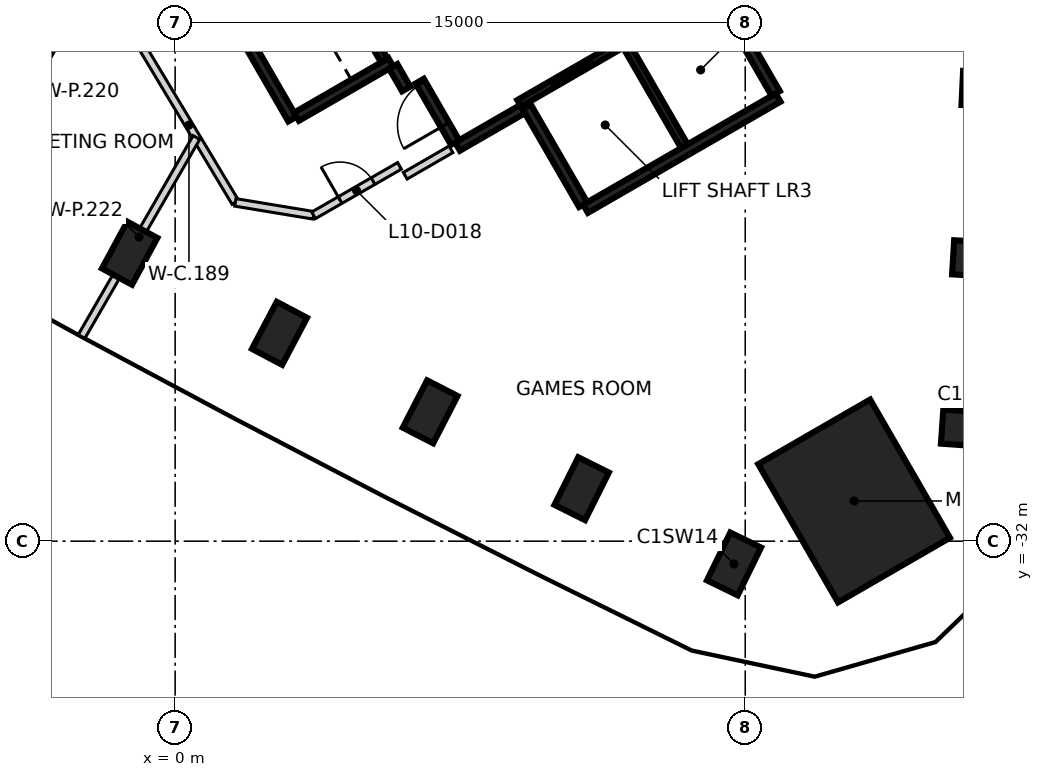
"""IFC4 building model, lengths in metres.
Left out: names, types, materials, properties, quantities, classifications, styles, units other than length and angle.
Written with IfcOpenShell. Run it as: python <this file> out.ifc"""

import sys

from ifc_helpers import new_model, si_unit, direction, frame, frame_2d, origin, origin_2d, place, context, subcontext, project, spatial, rectangle, extrude, element, fill, save


model = new_model("IFC4")
c1 = context("Model", 3, precision=1e-05, world=origin(), true_north=direction((0.0, 1.0)))
c2 = subcontext(c1, "Body", "Model", "MODEL_VIEW")
j1 = project(units=[si_unit("LENGTHUNIT", "METRE"), si_unit("PLANEANGLEUNIT", "RADIAN")], contexts=[c1])
p1 = place(None, origin())
s1 = spatial("IfcSite", under=j1, at=p1, CompositionType="ELEMENT")
p2 = place(p1, origin())
s2 = spatial("IfcBuilding", under=s1, at=p2, CompositionType="ELEMENT")
p3 = place(p2, frame((0.0, 0.0, 49.4)))
s3 = spatial("IfcBuildingStorey", under=s2, at=p3, CompositionType="ELEMENT", Elevation=49.4)
for number, where, z_axis, x_axis in (
    (1, (20.879, -29.034, -0.475), (0.0, 0.0, 1.0), (-0.998, 0.07, 0.0)),
    (2, (21.169, -24.573, -0.475), (0.0, 0.0, 1.0), (-0.998, 0.06, 0.0)),
    (3, (21.41, -20.109, -0.475), (0.0, 0.0, 1.0), (-0.999, 0.048, 0.0)),
    (4, (-1.197, -24.423, -0.475), (0.0, 0.0, 1.0), (0.476, 0.879, 0.0)),
    (5, (2.745, -26.531, -0.475), (0.0, 0.0, 1.0), (0.467, 0.884, 0.0)),
    (6, (6.71, -28.596, -0.475), (0.0, 0.0, 1.0), (0.458, 0.889, 0.0)),
    (7, (10.696, -30.619, -0.475), (0.0, 0.0, 1.0), (0.447, 0.894, 0.0)),
    (8, (14.705, -32.599, -0.475), (0.0, 0.0, 1.0), (0.438, 0.899, 0.0)),
):
    element("IfcColumn", number, at=place(p3, frame(where, z_axis=z_axis, x_axis=x_axis)), inside=s3, PredefinedType="COLUMN", context=c2, shape_type="SweptSolid", body=[
        extrude(rectangle(XDim=1.4, YDim=0.9, at=origin_2d()), origin(), (0.0, 0.0, 1.0), 3.6),
    ])
p4 = place(p3, frame((17.865, -30.942, -0.475), z_axis=(0.0, 0.0, 1.0), x_axis=(-0.5, 0.866025403784, 0.0)))
e9 = element("IfcColumn", 9, at=p4, inside=s3, PredefinedType="COLUMN", context=c2, shape_type="SweptSolid", body=[
    extrude(rectangle(XDim=4.2, YDim=3.4, at=origin_2d()), origin(), (0.0, 0.0, 1.0), 3.6),
])
p5 = place(p3, frame((15.865, -20.328, 0.0), z_axis=(0.0, 0.0, 1.0), x_axis=(-0.86602852612, -0.499994591916, 0.0)))
e10 = element("IfcWall", 10, at=p5, inside=s3, PredefinedType="SHEAR", context=c2, shape_type="SweptSolid", body=[
    extrude(rectangle(XDim=5.85, YDim=0.25, at=frame_2d((2.925, 0.0))), origin(), (0.0, 0.0, 1.0), 3.125),
])
for number, where, z_axis, x_axis in (
    (11, (14.315, -17.644, 0.0), (0.0, 0.0, 1.0), (0.5, -0.866, 0.0)),
    (12, (10.736, -23.145, 0.0), (0.0, 0.0, 1.0), (-0.5, 0.866, 0.0)),
):
    element("IfcWall", number, at=place(p3, frame(where, z_axis=z_axis, x_axis=x_axis)), inside=s3, PredefinedType="SHEAR", context=c2, shape_type="SweptSolid", body=[
        extrude(rectangle(XDim=2.974, YDim=0.25, at=frame_2d((1.487, 0.0))), origin(), (0.0, 0.0, 1.0), 3.125),
    ])
p6 = place(p3, frame((3.085, -20.894, 0.0), z_axis=(0.0, 0.0, 1.0), x_axis=(-0.499978833458, 0.866037623948, 0.0)))
e13 = element("IfcWall", 13, at=p6, inside=s3, PredefinedType="SHEAR", context=c2, shape_type="SweptSolid", body=[
    extrude(rectangle(XDim=3.05, YDim=0.25, at=frame_2d((1.525, 0.0))), origin(), (0.0, 0.0, 1.0), 3.125),
])
p7 = place(p3, frame((5.675, -19.399, 0.0), z_axis=(0.0, 0.0, 1.0), x_axis=(-0.866026637627, -0.499997862916, 0.0)))
e14 = element("IfcWall", 14, at=p7, inside=s3, PredefinedType="SHEAR", context=c2, shape_type="SweptSolid", body=[
    extrude(rectangle(XDim=2.865, YDim=0.25, at=frame_2d((1.432, 0.0))), origin(), (0.0, 0.0, 1.0), 3.125),
])
p8 = place(p3, frame((9.14, -20.631, 0.0), z_axis=(0.0, 0.0, 1.0), x_axis=(-0.866043531843, -0.499968599967, 0.0)))
e15 = element("IfcWall", 15, at=p8, inside=s3, PredefinedType="SHEAR", context=c2, shape_type="SweptSolid", body=[
    extrude(rectangle(XDim=1.975, YDim=0.25, at=frame_2d((0.987, 0.0))), origin(), (0.0, 0.0, 1.0), 3.125),
])
p9 = place(p3, frame((7.367, -21.51, 0.0), z_axis=(0.0, 0.0, 1.0), x_axis=(-0.499983108224, 0.866035156036, 0.0)))
e16 = element("IfcWall", 16, at=p9, inside=s3, PredefinedType="SHEAR", context=c2, shape_type="SweptSolid", body=[
    extrude(rectangle(XDim=1.865, YDim=0.25, at=frame_2d((0.932, 0.0))), origin(), (0.0, 0.0, 1.0), 3.125),
])
p10 = place(p9, frame((0.535, 0.0, 0.0)))
e17 = element("IfcOpeningElement", 17, at=p10, cuts=e16, PredefinedType="OPENING", context=c2, shape_type="SweptSolid", body=[
    extrude(rectangle(XDim=1.25, YDim=2.1, at=frame_2d((0.625, 1.05))), frame((0.0, 0.135, 0.0), z_axis=(0.0, -1.0, 0.0), x_axis=(1.0, 0.0, 0.0)), (0.0, 0.0, 1.0), 0.27),
])
p11 = place(p3, frame((6.08, -20.1, 0.0), z_axis=(0.0, 0.0, 1.0), x_axis=(-0.500051773299, 0.865995510393, 0.0)))
e18 = element("IfcWall", 18, at=p11, inside=s3, PredefinedType="SHEAR", context=c2, shape_type="SweptSolid", body=[
    extrude(rectangle(XDim=0.685, YDim=0.25, at=frame_2d((0.342, 0.0))), origin(), (0.0, 0.0, 1.0), 3.125),
])
p12 = place(p3, frame((9.052, -20.48, 0.0), z_axis=(0.0, 0.0, 1.0), x_axis=(0.866030299012, 0.499991521122, 0.0)))
e19 = element("IfcWall", 19, at=p12, inside=s3, PredefinedType="SHEAR", context=c2, shape_type="SweptSolid", body=[
    extrude(rectangle(XDim=6.1, YDim=0.2, at=frame_2d((3.05, 0.0))), origin(), (0.0, 0.0, 1.0), 3.125),
])
p13 = place(p12, frame((1.0, 0.0, 0.0)))
e20 = element("IfcOpeningElement", 20, at=p13, cuts=e19, PredefinedType="OPENING", context=c2, shape_type="SweptSolid", body=[
    extrude(rectangle(XDim=1.2, YDim=2.1, at=frame_2d((0.6, 1.05))), frame((0.0, 0.11, 0.0), z_axis=(0.0, -1.0, 0.0), x_axis=(1.0, 0.0, 0.0)), (0.0, 0.0, 1.0), 0.22),
])
p14 = place(p12, frame((4.05, 0.0, 0.0)))
e21 = element("IfcOpeningElement", 21, at=p14, cuts=e19, PredefinedType="OPENING", context=c2, shape_type="SweptSolid", body=[
    extrude(rectangle(XDim=1.2, YDim=2.1, at=frame_2d((0.6, 1.05))), frame((0.0, 0.11, 0.0), z_axis=(0.0, -1.0, 0.0), x_axis=(1.0, 0.0, 0.0)), (0.0, 0.0, 1.0), 0.22),
])
p15 = place(p3, frame((11.875, -18.967, 0.0), z_axis=(0.0, 0.0, 1.0), x_axis=(0.49998131003, -0.866036194175, 0.0)))
e22 = element("IfcWall", 22, at=p15, inside=s3, PredefinedType="SHEAR", context=c2, shape_type="SweptSolid", body=[
    extrude(rectangle(XDim=3.048, YDim=0.2, at=frame_2d((1.524, 0.0))), origin(), (0.0, 0.0, 1.0), 3.125),
])
p16 = place(p3, frame((5.503, -19.352, 0.0), z_axis=(0.0, 0.0, 1.0), x_axis=(-0.499986818241, 0.866033014143, 0.0)))
e23 = element("IfcWall", 23, at=p16, inside=s3, PredefinedType="SHEAR", context=c2, shape_type="SweptSolid", body=[
    extrude(rectangle(XDim=2.798, YDim=0.2, at=frame_2d((1.399, 0.0))), origin(), (0.0, 0.0, 1.0), 3.125),
])
p17 = place(p16, frame((0.949, 0.0, 0.0)))
e24 = element("IfcOpeningElement", 24, at=p17, cuts=e23, PredefinedType="OPENING", context=c2, shape_type="SweptSolid", body=[
    extrude(rectangle(XDim=0.9, YDim=2.1, at=frame_2d((0.45, 1.05))), frame((0.0, 0.11, 0.0), z_axis=(0.0, -1.0, 0.0), x_axis=(1.0, 0.0, 0.0)), (0.0, 0.0, 1.0), 0.22),
])
p18 = place(p3, frame((-0.858, -19.017, 0.0), z_axis=(0.0, 0.0, 1.0), x_axis=(0.514647068805, -0.857402119528, 0.0)))
e25 = element("IfcWall", 25, at=p18, inside=s3, PredefinedType="PARTITIONING", context=c2, shape_type="SweptSolid", body=[
    extrude(rectangle(XDim=4.745, YDim=0.2, at=frame_2d((2.373, 0.0))), origin(), (0.0, 0.0, 1.0), 3.125),
])
p19 = place(p3, frame((1.584, -23.086, 0.0), z_axis=(0.0, 0.0, 1.0), x_axis=(0.986633159246, -0.162957077405, 0.0)))
e26 = element("IfcWall", 26, at=p19, inside=s3, PredefinedType="PARTITIONING", context=c2, shape_type="SweptSolid", body=[
    extrude(rectangle(XDim=2.087, YDim=0.2, at=frame_2d((1.043, 0.0))), origin(), (0.0, 0.0, 1.0), 3.125),
])
p20 = place(p3, frame((3.643, -23.426, 0.0), z_axis=(0.0, 0.0, 1.0), x_axis=(0.866654350985, 0.498909045738, 0.0)))
e27 = element("IfcWall", 27, at=p20, inside=s3, PredefinedType="PARTITIONING", context=c2, shape_type="SweptSolid", body=[
    extrude(rectangle(XDim=2.608, YDim=0.2, at=frame_2d((1.304, 0.0))), origin(), (0.0, 0.0, 1.0), 3.125),
])
p21 = place(p20, frame((0.804, 0.0, 0.0)))
e28 = element("IfcOpeningElement", 28, at=p21, cuts=e27, PredefinedType="OPENING", context=c2, shape_type="SweptSolid", body=[
    extrude(rectangle(XDim=1.0, YDim=2.1, at=frame_2d((0.5, 1.05))), frame((0.0, 0.11, 0.0), z_axis=(0.0, -1.0, 0.0), x_axis=(1.0, 0.0, 0.0)), (0.0, 0.0, 1.0), 0.22),
])
p22 = place(p3, frame((6.054, -22.385, 0.0), z_axis=(0.0, 0.0, 1.0), x_axis=(0.86593101922, 0.500163443238, 0.0)))
e29 = element("IfcWall", 29, at=p22, inside=s3, PredefinedType="PARTITIONING", context=c2, shape_type="SweptSolid", body=[
    extrude(rectangle(XDim=1.39, YDim=0.2, at=frame_2d((0.695, 0.0))), origin(), (0.0, 0.0, 1.0), 3.125),
])
p23 = place(p3, frame((-6.381, -24.464, 0.0), z_axis=(0.0, 0.0, 1.0), x_axis=(0.500007577232, 0.866021029023, 0.0)))
e30 = element("IfcWall", 30, at=p23, inside=s3, PredefinedType="PARTITIONING", context=c2, shape_type="SweptSolid", body=[
    extrude(rectangle(XDim=9.883, YDim=0.2, at=frame_2d((4.941, 0.0))), origin(), (0.0, 0.0, 1.0), 3.125),
])
p24 = place(p3, frame((-2.462, -26.615, 0.0), z_axis=(0.0, 0.0, 1.0), x_axis=(0.49992636536, 0.86606791259, 0.0)))
e31 = element("IfcWall", 31, at=p24, inside=s3, PredefinedType="PARTITIONING", context=c2, shape_type="SweptSolid", body=[
    extrude(rectangle(XDim=6.046, YDim=0.2, at=frame_2d((3.023, 0.0))), origin(), (0.0, 0.0, 1.0), 3.125),
])
p25 = place(p13, origin())
e32 = element("IfcDoor", 32, at=p25, inside=s3, OperationType="DOUBLE_DOOR_SLIDING", PredefinedType="DOOR", context=c2, shape_type="SweptSolid", body=[
    extrude(rectangle(XDim=1.2, YDim=2.1, at=frame_2d((0.6, 1.05))), frame((0.0, 0.025, 0.0), z_axis=(0.0, -1.0, 0.0), x_axis=(1.0, 0.0, 0.0)), (0.0, 0.0, 1.0), 0.05),
])
fill(e20, e32)
p26 = place(p10, origin())
e33 = element("IfcDoor", 33, at=p26, inside=s3, OperationType="SINGLE_SWING_LEFT", PredefinedType="DOOR", context=c2, shape_type="SweptSolid", body=[
    extrude(rectangle(XDim=1.25, YDim=2.1, at=frame_2d((0.625, 1.05))), frame((0.0, 0.025, 0.0), z_axis=(0.0, -1.0, 0.0), x_axis=(1.0, 0.0, 0.0)), (0.0, 0.0, 1.0), 0.05),
])
fill(e17, e33)
p27 = place(p21, frame((1.0, 0.0, 0.0), z_axis=(0.0, 0.0, 1.0), x_axis=(-1.0, 0.0, 0.0)))
e34 = element("IfcDoor", 34, at=p27, inside=s3, OperationType="SINGLE_SWING_LEFT", PredefinedType="DOOR", context=c2, shape_type="SweptSolid", body=[
    extrude(rectangle(XDim=1.0, YDim=2.1, at=frame_2d((0.5, 1.05))), frame((0.0, 0.025, 0.0), z_axis=(0.0, -1.0, 0.0), x_axis=(1.0, 0.0, 0.0)), (0.0, 0.0, 1.0), 0.05),
])
fill(e28, e34)
save(model, sys.argv[1])
